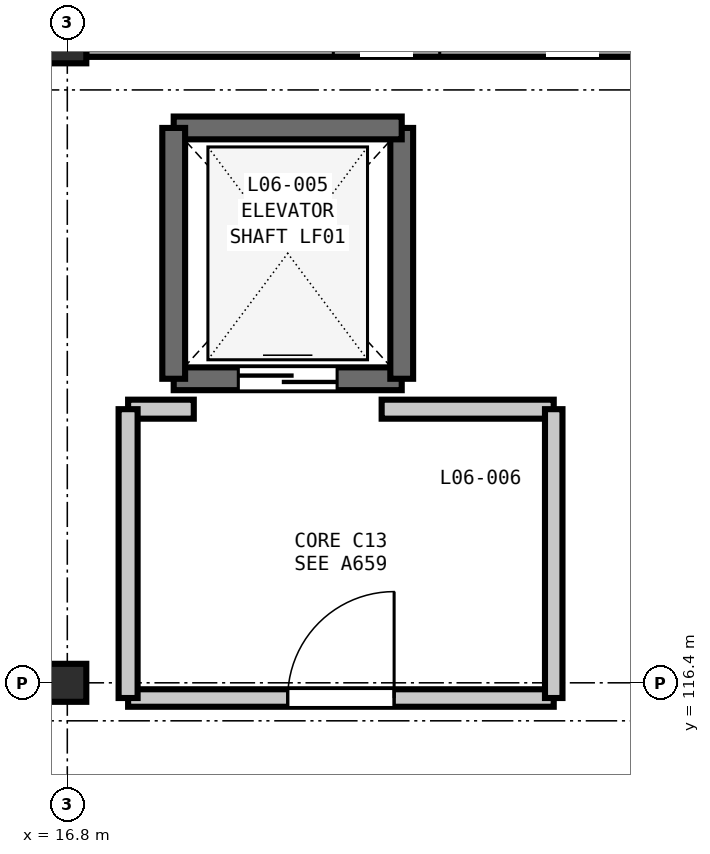
"""IFC4 building model, lengths in metres.
Left out: names, types, materials, properties, quantities, classifications, styles, units other than length and angle.
Written with IfcOpenShell. Run it as: python <this file> out.ifc"""

import sys

from ifc_helpers import new_model, si_unit, direction, frame, frame_2d, origin, origin_2d, place, context, subcontext, project, spatial, rectangle, extrude, element, fill, save


model = new_model("IFC4")
c1 = context("Model", 3, precision=1e-05, world=origin(), true_north=direction((0.0, 1.0)))
c2 = subcontext(c1, "Body", "Model", "MODEL_VIEW")
j1 = project(units=[si_unit("LENGTHUNIT", "METRE"), si_unit("PLANEANGLEUNIT", "RADIAN")], contexts=[c1])
p1 = place(None, origin())
s1 = spatial("IfcSite", under=j1, at=p1, CompositionType="ELEMENT")
p2 = place(p1, origin())
s2 = spatial("IfcBuilding", under=s1, at=p2, CompositionType="ELEMENT")
p3 = place(p2, frame((0.0, 0.0, 28.8)))
s3 = spatial("IfcBuildingStorey", under=s2, at=p3, CompositionType="ELEMENT", Elevation=28.8)
for number, where, z_axis, x_axis in (
    (1, (16.8, 116.4, 0.0), (0.0, 0.0, 1.0), (1.0, 0.0, 0.0)),
    (2, (16.8, 124.8, 0.0), (0.0, 0.0, 1.0), (1.0, 0.0, 0.0)),
):
    element("IfcColumn", number, at=place(p3, frame(where, z_axis=z_axis, x_axis=x_axis)), inside=s3, PredefinedType="COLUMN", context=c2, shape_type="SweptSolid", body=[
        extrude(rectangle(XDim=0.5, YDim=0.5, at=origin_2d()), origin(), (0.0, 0.0, 1.0), 4.2),
    ])
p4 = place(p3, frame((17.048, 124.8, 0.0), z_axis=(0.0, 0.0, 1.0), x_axis=(1.0, 0.0, 0.0)))
e3 = element("IfcWall", 3, at=p4, inside=s3, PredefinedType="SOLIDWALL", context=c2, shape_type="SweptSolid", body=[
    extrude(rectangle(XDim=7.904, YDim=0.33, at=frame_2d((3.952, 0.0))), origin(), (0.0, 0.0, 1.0), 3.48),
])
p5 = place(p4, frame((3.252, 0.0, 0.9)))
e4 = element("IfcOpeningElement", 4, at=p5, cuts=e3, PredefinedType="OPENING", context=c2, shape_type="SweptSolid", body=[
    extrude(rectangle(XDim=1.4, YDim=1.95, at=frame_2d((0.7, 0.975))), frame((0.0, 0.175, 0.0), z_axis=(0.0, -1.0, 0.0), x_axis=(1.0, 0.0, 0.0)), (0.0, 0.0, 1.0), 0.35),
])
p6 = place(p3, frame((18.2, 120.4, 0.0), z_axis=(0.0, 0.0, 1.0), x_axis=(1.0, 0.0, 0.0)))
e5 = element("IfcWall", 5, at=p6, inside=s3, PredefinedType="SHEAR", context=c2, shape_type="SweptSolid", body=[
    extrude(rectangle(XDim=3.0, YDim=0.3, at=frame_2d((1.5, 0.0))), origin(), (0.0, 0.0, 1.0), 4.2),
])
p7 = place(p6, frame((0.85, 0.0, 0.0)))
e6 = element("IfcOpeningElement", 6, at=p7, cuts=e5, PredefinedType="OPENING", context=c2, shape_type="SweptSolid", body=[
    extrude(rectangle(XDim=1.3, YDim=2.2, at=frame_2d((0.65, 1.1))), frame((0.0, 0.16, 0.0), z_axis=(0.0, -1.0, 0.0), x_axis=(1.0, 0.0, 0.0)), (0.0, 0.0, 1.0), 0.32),
])
p8 = place(p3, frame((21.2, 120.4, 0.0), z_axis=(0.0, 0.0, 1.0), x_axis=(0.0, 1.0, 0.0)))
e7 = element("IfcWall", 7, at=p8, inside=s3, PredefinedType="SHEAR", context=c2, shape_type="SweptSolid", body=[
    extrude(rectangle(XDim=3.3, YDim=0.3, at=frame_2d((1.65, 0.0))), origin(), (0.0, 0.0, 1.0), 4.2),
])
p9 = place(p3, frame((21.2, 123.7, 0.0), z_axis=(0.0, 0.0, 1.0), x_axis=(-1.0, 0.0, 0.0)))
e8 = element("IfcWall", 8, at=p9, inside=s3, PredefinedType="SHEAR", context=c2, shape_type="SweptSolid", body=[
    extrude(rectangle(XDim=3.0, YDim=0.3, at=frame_2d((1.5, 0.0))), origin(), (0.0, 0.0, 1.0), 4.2),
])
p10 = place(p3, frame((18.2, 123.7, 0.0), z_axis=(0.0, 0.0, 1.0), x_axis=(0.0, -1.0, 0.0)))
e9 = element("IfcWall", 9, at=p10, inside=s3, PredefinedType="SHEAR", context=c2, shape_type="SweptSolid", body=[
    extrude(rectangle(XDim=3.3, YDim=0.3, at=frame_2d((1.65, 0.0))), origin(), (0.0, 0.0, 1.0), 4.2),
])
p11 = place(p3, frame((17.6, 116.2, 0.0), z_axis=(0.0, 0.0, 1.0), x_axis=(1.0, 0.0, 0.0)))
e10 = element("IfcWall", 10, at=p11, inside=s3, PredefinedType="PARTITIONING", context=c2, shape_type="SweptSolid", body=[
    extrude(rectangle(XDim=5.6, YDim=0.23, at=frame_2d((2.8, 0.0))), origin(), (0.0, 0.0, 1.0), 3.635),
])
p12 = place(p11, frame((2.1, 0.0, 0.0)))
e11 = element("IfcOpeningElement", 11, at=p12, cuts=e10, PredefinedType="OPENING", context=c2, shape_type="SweptSolid", body=[
    extrude(rectangle(XDim=1.4, YDim=2.2, at=frame_2d((0.7, 1.1))), frame((0.0, 0.125, 0.0), z_axis=(0.0, -1.0, 0.0), x_axis=(1.0, 0.0, 0.0)), (0.0, 0.0, 1.0), 0.25),
])
p13 = place(p3, frame((20.936, 120.0, 0.0), z_axis=(0.0, 0.0, 1.0), x_axis=(1.0, 0.0, 0.0)))
e12 = element("IfcWall", 12, at=p13, inside=s3, PredefinedType="PARTITIONING", context=c2, shape_type="SweptSolid", body=[
    extrude(rectangle(XDim=2.264, YDim=0.25, at=frame_2d((1.132, 0.0))), origin(), (0.0, 0.0, 1.0), 3.92),
])
p14 = place(p3, frame((17.6, 120.0, 0.0), z_axis=(0.0, 0.0, 1.0), x_axis=(1.0, 0.0, 0.0)))
e13 = element("IfcWall", 13, at=p14, inside=s3, PredefinedType="PARTITIONING", context=c2, shape_type="SweptSolid", body=[
    extrude(rectangle(XDim=0.864, YDim=0.25, at=frame_2d((0.432, 0.0))), origin(), (0.0, 0.0, 1.0), 3.92),
])
p15 = place(p3, frame((17.6, 116.2, 0.0), z_axis=(0.0, 0.0, 1.0), x_axis=(0.0, 1.0, 0.0)))
e14 = element("IfcWall", 14, at=p15, inside=s3, PredefinedType="PARTITIONING", context=c2, shape_type="SweptSolid", body=[
    extrude(rectangle(XDim=3.8, YDim=0.25, at=frame_2d((1.9, 0.0))), origin(), (0.0, 0.0, 1.0), 3.92),
])
p16 = place(p3, frame((23.2, 116.2, 0.0), z_axis=(0.0, 0.0, 1.0), x_axis=(0.0, 1.0, 0.0)))
e15 = element("IfcWall", 15, at=p16, inside=s3, PredefinedType="PARTITIONING", context=c2, shape_type="SweptSolid", body=[
    extrude(rectangle(XDim=3.8, YDim=0.23, at=frame_2d((1.9, 0.0))), origin(), (0.0, 0.0, 1.0), 3.92),
])
p17 = place(p7, origin())
e16 = element("IfcDoor", 16, at=p17, inside=s3, OperationType="DOUBLE_DOOR_SLIDING", PredefinedType="DOOR", context=c2, shape_type="SweptSolid", body=[
    extrude(rectangle(XDim=1.3, YDim=2.2, at=frame_2d((0.65, 1.1))), frame((0.0, 0.025, 0.0), z_axis=(0.0, -1.0, 0.0), x_axis=(1.0, 0.0, 0.0)), (0.0, 0.0, 1.0), 0.05),
])
fill(e6, e16)
p18 = place(p12, origin())
e17 = element("IfcDoor", 17, at=p18, inside=s3, OperationType="SINGLE_SWING_RIGHT", PredefinedType="DOOR", context=c2, shape_type="SweptSolid", body=[
    extrude(rectangle(XDim=1.4, YDim=2.2, at=frame_2d((0.7, 1.1))), frame((0.0, 0.025, 0.0), z_axis=(0.0, -1.0, 0.0), x_axis=(1.0, 0.0, 0.0)), (0.0, 0.0, 1.0), 0.05),
])
fill(e11, e17)
save(model, sys.argv[1])
